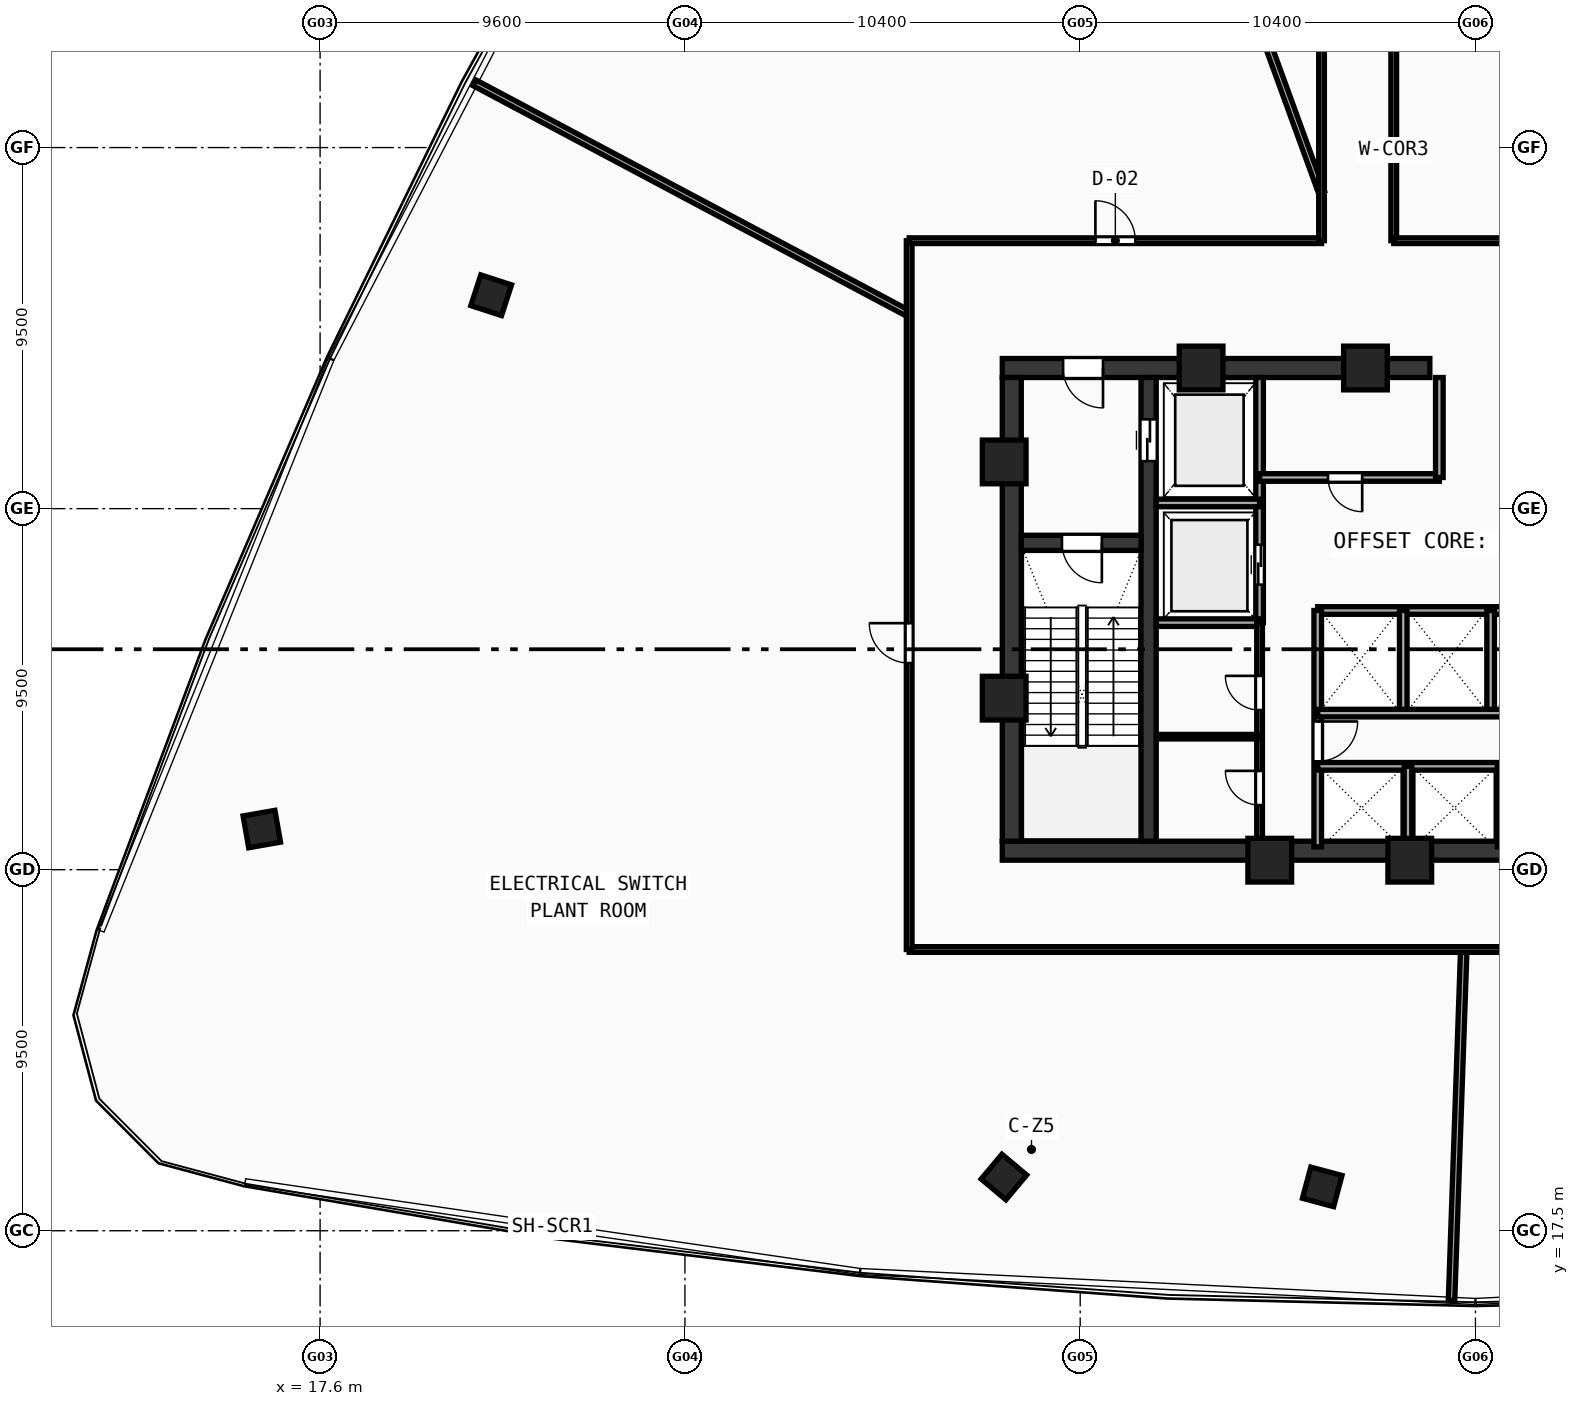
"""IFC4 building model, lengths in metres.
Left out: names, types, materials, properties, quantities, classifications, styles, units other than length and angle.
Written with IfcOpenShell. Run it as: python <this file> out.ifc"""

import sys

from ifc_helpers import new_model, si_unit, direction, frame, frame_2d, origin, origin_with_axes, origin_2d, place, context, subcontext, project, spatial, rectangle, hollow_rectangle, extrude, source, transform, mapped, element, fill, save


model = new_model("IFC4")
c1 = context("Model", 3, precision=1e-05, world=origin(), true_north=direction((0.0, 1.0)))
c2 = subcontext(c1, "Body", "Model", "MODEL_VIEW")
j1 = project(units=[si_unit("LENGTHUNIT", "METRE"), si_unit("PLANEANGLEUNIT", "RADIAN")], contexts=[c1])
p1 = place(None, origin())
s1 = spatial("IfcSite", under=j1, at=p1, CompositionType="ELEMENT")
p2 = place(p1, origin())
s2 = spatial("IfcBuilding", under=s1, at=p2, CompositionType="ELEMENT")
p3 = place(p2, frame((0.0, 0.0, 224.81)))
s3 = spatial("IfcBuildingStorey", under=s2, at=p3, CompositionType="ELEMENT", Elevation=224.81)
p4 = place(p3, frame((35.55, 27.5, 0.0), z_axis=(0.0, 0.0, 1.0), x_axis=(1.0, 0.0, 0.0)))
e1 = element("IfcWall", 1, at=p4, inside=s3, PredefinedType="SHEAR", context=c2, shape_type="SweptSolid", body=[
    extrude(rectangle(XDim=24.9, YDim=0.5, at=frame_2d((12.45, 0.0))), origin(), (0.0, 0.0, 1.0), 4.54),
])
p5 = place(p3, frame((35.55, 40.2, 0.0), z_axis=(0.0, 0.0, 1.0), x_axis=(1.0, 0.0, 0.0)))
e2 = element("IfcWall", 2, at=p5, inside=s3, PredefinedType="SHEAR", context=c2, shape_type="SweptSolid", body=[
    extrude(rectangle(XDim=11.25, YDim=0.5, at=frame_2d((5.625, 0.0))), origin(), (0.0, 0.0, 1.0), 4.54),
])
p6 = place(p5, frame((1.6, 0.0, 0.0)))
e3 = element("IfcOpeningElement", 3, at=p6, cuts=e2, PredefinedType="OPENING", context=c2, shape_type="SweptSolid", body=[
    extrude(rectangle(XDim=1.05, YDim=2.1, at=frame_2d((0.525, 1.05))), frame((0.0, 0.26, 0.0), z_axis=(0.0, -1.0, 0.0), x_axis=(1.0, 0.0, 0.0)), (0.0, 0.0, 1.0), 0.52),
])
p7 = place(p3, frame((35.8, 27.75, 0.0), z_axis=(0.0, 0.0, 1.0), x_axis=(0.0, 1.0, 0.0)))
e4 = element("IfcWall", 4, at=p7, inside=s3, PredefinedType="SHEAR", context=c2, shape_type="SweptSolid", body=[
    extrude(rectangle(XDim=12.2, YDim=0.5, at=frame_2d((6.1, 0.0))), origin(), (0.0, 0.0, 1.0), 4.54),
])
p8 = place(p3, frame((39.4, 27.75, 0.0), z_axis=(0.0, 0.0, 1.0), x_axis=(0.0, 1.0, 0.0)))
e5 = element("IfcWall", 5, at=p8, inside=s3, PredefinedType="SHEAR", context=c2, shape_type="SweptSolid", body=[
    extrude(rectangle(XDim=12.2, YDim=0.4, at=frame_2d((6.1, 0.0))), origin(), (0.0, 0.0, 1.0), 4.54),
])
p9 = place(p8, frame((10.0, 0.0, 0.0)))
e6 = element("IfcOpeningElement", 6, at=p9, cuts=e5, PredefinedType="OPENING", context=c2, shape_type="SweptSolid", body=[
    extrude(rectangle(XDim=1.1, YDim=2.1, at=frame_2d((0.55, 1.05))), frame((0.0, 0.21, 0.0), z_axis=(0.0, -1.0, 0.0), x_axis=(1.0, 0.0, 0.0)), (0.0, 0.0, 1.0), 0.42),
])
p10 = place(p3, frame((36.05, 35.6, 0.0), z_axis=(0.0, 0.0, 1.0), x_axis=(1.0, 0.0, 0.0)))
e7 = element("IfcWall", 7, at=p10, inside=s3, PredefinedType="SHEAR", context=c2, shape_type="SweptSolid", body=[
    extrude(rectangle(XDim=3.15, YDim=0.4, at=frame_2d((1.575, 0.0))), origin(), (0.0, 0.0, 1.0), 4.54),
])
p11 = place(p10, frame((1.07, 0.0, 0.0)))
e8 = element("IfcOpeningElement", 8, at=p11, cuts=e7, PredefinedType="OPENING", context=c2, shape_type="SweptSolid", body=[
    extrude(rectangle(XDim=1.05, YDim=2.1, at=frame_2d((0.525, 1.05))), frame((0.0, 0.21, 0.0), z_axis=(0.0, -1.0, 0.0), x_axis=(1.0, 0.0, 0.0)), (0.0, 0.0, 1.0), 0.42),
])
m1 = source(origin(), c2, "Body", "SweptSolid", [
    extrude(hollow_rectangle(XDim=1.15, YDim=1.15, WallThickness=0.048, at=origin_2d()), origin(), (0.0, 0.0, 1.0), 4.82),
])
for number, where, z_axis, x_axis in (
    (9, (42.588, 27.25, -0.28), (0.0, 0.0, 1.0), (1.0, 0.0, 0.0)),
    (10, (46.272, 27.25, -0.28), (0.0, 0.0, 1.0), (1.0, 0.0, 0.0)),
    (11, (45.106, 40.2, -0.28), (0.0, 0.0, 1.0), (1.0, 0.0, 0.0)),
    (12, (40.781, 40.2, -0.28), (0.0, 0.0, 1.0), (1.0, 0.0, 0.0)),
    (13, (35.6, 37.729, -0.28), (0.0, 0.0, 1.0), (1.0, 0.0, 0.0)),
    (14, (35.6, 31.513, -0.28), (0.0, 0.0, 1.0), (1.0, 0.0, 0.0)),
):
    element("IfcColumn", number, at=place(p3, frame(where, z_axis=z_axis, x_axis=x_axis)), inside=s3, PredefinedType="COLUMN", context=c2, shape_type="MappedRepresentation", body=[
        mapped(m1, transform((0.0, 0.0, 0.0), scale=1.0)),
    ])
m2 = source(origin(), c2, "Body", "SweptSolid", [
    extrude(hollow_rectangle(XDim=0.85, YDim=0.85, WallThickness=0.034, at=origin_2d()), origin(), (0.0, 0.0, 1.0), 4.82),
])
for number, where, z_axis, x_axis in (
    (15, (35.593, 18.914, -0.28), (0.0, 0.0, 1.0), (0.766, -0.643, 0.0)),
    (16, (43.969, 18.654, -0.28), (0.0, 0.0, 1.0), (0.966, -0.259, 0.0)),
    (17, (22.102, 42.115, -0.28), (0.0, 0.0, 1.0), (-0.309, -0.951, 0.0)),
    (18, (16.066, 28.069, -0.28), (0.0, 0.0, 1.0), (0.174, -0.985, 0.0)),
):
    element("IfcColumn", number, at=place(p3, frame(where, z_axis=z_axis, x_axis=x_axis)), inside=s3, PredefinedType="COLUMN", context=c2, shape_type="MappedRepresentation", body=[
        mapped(m2, transform((0.0, 0.0, 0.0), scale=1.0)),
    ])
p12 = place(p3, frame((42.32, 33.5, 0.0), z_axis=(0.0, 0.0, 1.0), x_axis=(0.0, 1.0, 0.0)))
e19 = element("IfcWall", 19, at=p12, inside=s3, PredefinedType="SOLIDWALL", context=c2, shape_type="SweptSolid", body=[
    extrude(rectangle(XDim=6.45, YDim=0.2, at=frame_2d((3.225, 0.0))), origin(), (0.0, 0.0, 1.0), 4.54),
])
p13 = place(p12, frame((1.0, 0.0, 0.0)))
e20 = element("IfcOpeningElement", 20, at=p13, cuts=e19, PredefinedType="OPENING", context=c2, shape_type="SweptSolid", body=[
    extrude(rectangle(XDim=1.05, YDim=2.1, at=frame_2d((0.525, 1.05))), frame((0.0, 0.11, 0.0), z_axis=(0.0, -1.0, 0.0), x_axis=(1.0, 0.0, 0.0)), (0.0, 0.0, 1.0), 0.22),
])
for number, where, z_axis, x_axis in (
    (21, (39.6, 36.65, 0.0), (0.0, 0.0, 1.0), (1.0, 0.0, 0.0)),
    (22, (39.6, 33.5, 0.0), (0.0, 0.0, 1.0), (1.0, 0.0, 0.0)),
):
    element("IfcWall", number, at=place(p3, frame(where, z_axis=z_axis, x_axis=x_axis)), inside=s3, PredefinedType="SOLIDWALL", context=c2, shape_type="SweptSolid", body=[
        extrude(rectangle(XDim=2.72, YDim=0.2, at=frame_2d((1.36, 0.0))), origin(), (0.0, 0.0, 1.0), 4.54),
    ])
p14 = place(p3, frame((42.32, 37.32, 0.0), z_axis=(0.0, 0.0, 1.0), x_axis=(1.0, 0.0, 0.0)))
e23 = element("IfcWall", 23, at=p14, inside=s3, PredefinedType="SOLIDWALL", context=c2, shape_type="SweptSolid", body=[
    extrude(rectangle(XDim=4.73, YDim=0.2, at=frame_2d((2.365, 0.0))), origin(), (0.0, 0.0, 1.0), 4.54),
])
p15 = place(p14, frame((1.8, 0.0, 0.0)))
e24 = element("IfcOpeningElement", 24, at=p15, cuts=e23, PredefinedType="OPENING", context=c2, shape_type="SweptSolid", body=[
    extrude(rectangle(XDim=0.9, YDim=2.1, at=frame_2d((0.45, 1.05))), frame((0.0, 0.11, 0.0), z_axis=(0.0, -1.0, 0.0), x_axis=(1.0, 0.0, 0.0)), (0.0, 0.0, 1.0), 0.22),
])
p16 = place(p3, frame((47.05, 37.32, 0.0), z_axis=(0.0, 0.0, 1.0), x_axis=(0.0, 1.0, 0.0)))
e25 = element("IfcWall", 25, at=p16, inside=s3, PredefinedType="SOLIDWALL", context=c2, shape_type="SweptSolid", body=[
    extrude(rectangle(XDim=2.63, YDim=0.2, at=frame_2d((1.315, 0.0))), origin(), (0.0, 0.0, 1.0), 4.54),
])
p17 = place(p3, frame((43.85, 33.82, 0.0), z_axis=(0.0, 0.0, 1.0), x_axis=(1.0, 0.0, 0.0)))
e26 = element("IfcWall", 26, at=p17, inside=s3, PredefinedType="SOLIDWALL", context=c2, shape_type="SweptSolid", body=[
    extrude(rectangle(XDim=9.83, YDim=0.2, at=frame_2d((4.915, 0.0))), origin(), (0.0, 0.0, 1.0), 4.54),
])
p18 = place(p3, frame((43.85, 27.6, 0.0), z_axis=(0.0, 0.0, 1.0), x_axis=(0.0, 1.0, 0.0)))
e27 = element("IfcWall", 27, at=p18, inside=s3, PredefinedType="SOLIDWALL", context=c2, shape_type="SweptSolid", body=[
    extrude(rectangle(XDim=6.22, YDim=0.2, at=frame_2d((3.11, 0.0))), origin(), (0.0, 0.0, 1.0), 4.54),
])
p19 = place(p18, frame((2.25, 0.0, 0.0)))
e28 = element("IfcOpeningElement", 28, at=p19, cuts=e27, PredefinedType="OPENING", context=c2, shape_type="SweptSolid", body=[
    extrude(rectangle(XDim=1.05, YDim=2.1, at=frame_2d((0.525, 1.05))), frame((0.0, 0.11, 0.0), z_axis=(0.0, -1.0, 0.0), x_axis=(1.0, 0.0, 0.0)), (0.0, 0.0, 1.0), 0.22),
])
for number, where, z_axis, x_axis in (
    (29, (46.1, 31.12, 0.0), (0.0, 0.0, 1.0), (0.0, 1.0, 0.0)),
    (30, (48.4, 31.12, 0.0), (0.0, 0.0, 1.0), (0.0, 1.0, 0.0)),
):
    element("IfcWall", number, at=place(p3, frame(where, z_axis=z_axis, x_axis=x_axis)), inside=s3, PredefinedType="SOLIDWALL", context=c2, shape_type="SweptSolid", body=[
        extrude(rectangle(XDim=2.7, YDim=0.2, at=frame_2d((1.35, 0.0))), origin(), (0.0, 0.0, 1.0), 4.54),
    ])
p20 = place(p3, frame((43.85, 29.72, 0.0), z_axis=(0.0, 0.0, 1.0), x_axis=(1.0, 0.0, 0.0)))
e31 = element("IfcWall", 31, at=p20, inside=s3, PredefinedType="SOLIDWALL", context=c2, shape_type="SweptSolid", body=[
    extrude(rectangle(XDim=7.2, YDim=0.2, at=frame_2d((3.6, 0.0))), origin(), (0.0, 0.0, 1.0), 4.54),
])
p21 = place(p3, frame((43.85, 31.12, 0.0), z_axis=(0.0, 0.0, 1.0), x_axis=(1.0, 0.0, 0.0)))
e32 = element("IfcWall", 32, at=p21, inside=s3, PredefinedType="SOLIDWALL", context=c2, shape_type="SweptSolid", body=[
    extrude(rectangle(XDim=9.83, YDim=0.2, at=frame_2d((4.915, 0.0))), origin(), (0.0, 0.0, 1.0), 4.54),
])
for number, where, z_axis, x_axis in (
    (33, (46.225, 27.6, 0.0), (0.0, 0.0, 1.0), (0.0, 1.0, 0.0)),
    (34, (48.675, 27.6, 0.0), (0.0, 0.0, 1.0), (0.0, 1.0, 0.0)),
):
    element("IfcWall", number, at=place(p3, frame(where, z_axis=z_axis, x_axis=x_axis)), inside=s3, PredefinedType="SOLIDWALL", context=c2, shape_type="SweptSolid", body=[
        extrude(rectangle(XDim=2.12, YDim=0.2, at=frame_2d((1.06, 0.0))), origin(), (0.0, 0.0, 1.0), 4.54),
    ])
p22 = place(p3, frame((42.32, 27.6, 0.0), z_axis=(0.0, 0.0, 1.0), x_axis=(0.0, 1.0, 0.0)))
e35 = element("IfcWall", 35, at=p22, inside=s3, PredefinedType="PARTITIONING", context=c2, shape_type="SweptSolid", body=[
    extrude(rectangle(XDim=5.9, YDim=0.15, at=frame_2d((2.95, 0.0))), origin(), (0.0, 0.0, 1.0), 4.54),
])
p23 = place(p22, frame((1.1, 0.0, 0.0)))
e36 = element("IfcOpeningElement", 36, at=p23, cuts=e35, PredefinedType="OPENING", context=c2, shape_type="SweptSolid", body=[
    extrude(rectangle(XDim=0.9, YDim=2.1, at=frame_2d((0.45, 1.05))), frame((0.0, 0.085, 0.0), z_axis=(0.0, -1.0, 0.0), x_axis=(1.0, 0.0, 0.0)), (0.0, 0.0, 1.0), 0.17),
])
p24 = place(p22, frame((3.6, 0.0, 0.0)))
e37 = element("IfcOpeningElement", 37, at=p24, cuts=e35, PredefinedType="OPENING", context=c2, shape_type="SweptSolid", body=[
    extrude(rectangle(XDim=0.9, YDim=2.1, at=frame_2d((0.45, 1.05))), frame((0.0, 0.085, 0.0), z_axis=(0.0, -1.0, 0.0), x_axis=(1.0, 0.0, 0.0)), (0.0, 0.0, 1.0), 0.17),
])
p25 = place(p3, frame((39.6, 30.5, 0.0), z_axis=(0.0, 0.0, 1.0), x_axis=(1.0, 0.0, 0.0)))
e38 = element("IfcWall", 38, at=p25, inside=s3, PredefinedType="PARTITIONING", context=c2, shape_type="SweptSolid", body=[
    extrude(rectangle(XDim=2.72, YDim=0.12, at=frame_2d((1.36, 0.0))), origin(), (0.0, 0.0, 1.0), 4.54),
])
p26 = place(p3, frame((43.95, 44.827, 0.0), z_axis=(0.0, 0.0, 1.0), x_axis=(-0.342014940405, 0.939694514478, 0.0)))
e39 = element("IfcWall", 39, at=p26, inside=s3, PredefinedType="PARTITIONING", context=c2, shape_type="SweptSolid", body=[
    extrude(rectangle(XDim=26.099, YDim=0.17, at=frame_2d((13.05, 0.0))), origin(), (0.0, 0.0, 1.0), 3.89),
])
p27 = place(p3, frame((33.1, 41.623, 0.0), z_axis=(0.0, 0.0, 1.0), x_axis=(-0.88294771871, 0.469471326093, 0.0)))
e40 = element("IfcWall", 40, at=p27, inside=s3, PredefinedType="PARTITIONING", context=c2, shape_type="SweptSolid", body=[
    extrude(rectangle(XDim=12.949, YDim=0.17, at=frame_2d((6.475, 0.0))), origin(), (0.0, 0.0, 1.0), 3.89),
])
p28 = place(p3, frame((47.693, 24.9, 0.0), z_axis=(0.0, 0.0, 1.0), x_axis=(-0.034893830419, -0.999391024874, 0.0)))
e41 = element("IfcWall", 41, at=p28, inside=s3, PredefinedType="PARTITIONING", context=c2, shape_type="SweptSolid", body=[
    extrude(rectangle(XDim=9.236, YDim=0.17, at=frame_2d((4.618, 0.0))), origin(), (0.0, 0.0, 1.0), 3.89),
])
p29 = place(p3, frame((45.85, 55.78, 0.0), z_axis=(0.0, 0.0, 1.0), x_axis=(0.0, -1.0, 0.0)))
e42 = element("IfcWall", 42, at=p29, inside=s3, PredefinedType="PARTITIONING", context=c2, shape_type="SweptSolid", body=[
    extrude(rectangle(XDim=12.23, YDim=0.15, at=frame_2d((6.115, 0.0))), origin(), (0.0, 0.0, 1.0), 4.19),
])
p30 = place(p29, frame((5.59, 0.0, 0.0)))
e43 = element("IfcOpeningElement", 43, at=p30, cuts=e42, PredefinedType="OPENING", context=c2, shape_type="SweptSolid", body=[
    extrude(rectangle(XDim=1.05, YDim=2.1, at=frame_2d((0.525, 1.05))), frame((0.0, 0.085, 0.0), z_axis=(0.0, -1.0, 0.0), x_axis=(1.0, 0.0, 0.0)), (0.0, 0.0, 1.0), 0.17),
])
p31 = place(p3, frame((45.85, 43.55, 0.0), z_axis=(0.0, 0.0, 1.0), x_axis=(1.0, 0.0, 0.0)))
e44 = element("IfcWall", 44, at=p31, inside=s3, PredefinedType="PARTITIONING", context=c2, shape_type="SweptSolid", body=[
    extrude(rectangle(XDim=17.05, YDim=0.15, at=frame_2d((8.525, 0.0))), origin(), (0.0, 0.0, 1.0), 3.89),
])
p32 = place(p31, frame((11.167, 0.0, 0.0)))
e45 = element("IfcOpeningElement", 45, at=p32, cuts=e44, PredefinedType="OPENING", context=c2, shape_type="SweptSolid", body=[
    extrude(rectangle(XDim=1.05, YDim=2.1, at=frame_2d((0.525, 1.05))), frame((0.0, 0.085, 0.0), z_axis=(0.0, -1.0, 0.0), x_axis=(1.0, 0.0, 0.0)), (0.0, 0.0, 1.0), 0.17),
])
p33 = place(p3, frame((62.9, 24.9, 0.0), z_axis=(0.0, 0.0, 1.0), x_axis=(-1.0, 0.0, 0.0)))
e46 = element("IfcWall", 46, at=p33, inside=s3, PredefinedType="PARTITIONING", context=c2, shape_type="SweptSolid", body=[
    extrude(rectangle(XDim=29.8, YDim=0.15, at=frame_2d((14.9, 0.0))), origin(), (0.0, 0.0, 1.0), 3.89),
])
p34 = place(p3, frame((33.1, 24.9, 0.0), z_axis=(0.0, 0.0, 1.0), x_axis=(0.0, 1.0, 0.0)))
e47 = element("IfcWall", 47, at=p34, inside=s3, PredefinedType="PARTITIONING", context=c2, shape_type="SweptSolid", body=[
    extrude(rectangle(XDim=18.65, YDim=0.15, at=frame_2d((9.325, 0.0))), origin(), (0.0, 0.0, 1.0), 3.89),
])
p35 = place(p34, frame((7.536, 0.0, 0.0)))
e48 = element("IfcOpeningElement", 48, at=p35, cuts=e47, PredefinedType="OPENING", context=c2, shape_type="SweptSolid", body=[
    extrude(rectangle(XDim=1.05, YDim=2.1, at=frame_2d((0.525, 1.05))), frame((0.0, 0.085, 0.0), z_axis=(0.0, -1.0, 0.0), x_axis=(1.0, 0.0, 0.0)), (0.0, 0.0, 1.0), 0.17),
])
p36 = place(p3, frame((33.1, 43.55, 0.0), z_axis=(0.0, 0.0, 1.0), x_axis=(1.0, 0.0, 0.0)))
e49 = element("IfcWall", 49, at=p36, inside=s3, PredefinedType="PARTITIONING", context=c2, shape_type="SweptSolid", body=[
    extrude(rectangle(XDim=10.85, YDim=0.15, at=frame_2d((5.425, 0.0))), origin(), (0.0, 0.0, 1.0), 3.89),
])
p37 = place(p36, frame((4.9, 0.0, 0.0)))
e50 = element("IfcOpeningElement", 50, at=p37, cuts=e49, PredefinedType="OPENING", context=c2, shape_type="SweptSolid", body=[
    extrude(rectangle(XDim=1.05, YDim=2.1, at=frame_2d((0.525, 1.05))), frame((0.0, 0.085, 0.0), z_axis=(0.0, -1.0, 0.0), x_axis=(1.0, 0.0, 0.0)), (0.0, 0.0, 1.0), 0.17),
])
p38 = place(p3, frame((43.95, 43.55, 0.0), z_axis=(0.0, 0.0, 1.0), x_axis=(0.0, 1.0, 0.0)))
e51 = element("IfcWall", 51, at=p38, inside=s3, PredefinedType="PARTITIONING", context=c2, shape_type="SweptSolid", body=[
    extrude(rectangle(XDim=12.23, YDim=0.15, at=frame_2d((6.115, 0.0))), origin(), (0.0, 0.0, 1.0), 4.19),
])
m3 = source(origin(), c2, "Body", "SweptSolid", [
    extrude(rectangle(XDim=1.05, YDim=2.1, at=frame_2d((0.525, 1.05))), frame((0.0, 0.025, 0.0), z_axis=(0.0, -1.0, 0.0), x_axis=(1.0, 0.0, 0.0)), (0.0, 0.0, 1.0), 0.05),
])
p39 = place(p11, frame((1.05, 0.0, 0.0), z_axis=(0.0, 0.0, 1.0), x_axis=(-1.0, 0.0, 0.0)))
e52 = element("IfcDoor", 52, at=p39, inside=s3, OperationType="SINGLE_SWING_LEFT", PredefinedType="DOOR", context=c2, shape_type="MappedRepresentation", body=[
    mapped(m3, transform((0.0, 0.0, 0.0), scale=1.0)),
])
fill(e8, e52)
p40 = place(p6, frame((1.05, 0.0, 0.0), z_axis=(0.0, 0.0, 1.0), x_axis=(-1.0, 0.0, 0.0)))
e53 = element("IfcDoor", 53, at=p40, inside=s3, OperationType="SINGLE_SWING_LEFT", PredefinedType="DOOR", context=c2, shape_type="MappedRepresentation", body=[
    mapped(m3, transform((0.0, 0.0, 0.0), scale=1.0)),
])
fill(e3, e53)
m4 = source(origin(), c2, "Body", "SweptSolid", [
    extrude(rectangle(XDim=1.1, YDim=2.1, at=frame_2d((0.55, 1.05))), frame((0.0, 0.025, 0.0), z_axis=(0.0, -1.0, 0.0), x_axis=(1.0, 0.0, 0.0)), (0.0, 0.0, 1.0), 0.05),
])
p41 = place(p9, frame((1.1, 0.0, 0.0), z_axis=(0.0, 0.0, 1.0), x_axis=(-1.0, 0.0, 0.0)))
e54 = element("IfcDoor", 54, at=p41, inside=s3, OperationType="DOUBLE_DOOR_SLIDING", PredefinedType="DOOR", context=c2, shape_type="MappedRepresentation", body=[
    mapped(m4, transform((0.0, 0.0, 0.0), scale=1.0)),
])
fill(e6, e54)
p42 = place(p13, origin_with_axes())
e55 = element("IfcDoor", 55, at=p42, inside=s3, OperationType="DOUBLE_DOOR_SLIDING", PredefinedType="DOOR", context=c2, shape_type="MappedRepresentation", body=[
    mapped(m3, transform((0.0, 0.0, 0.0), scale=1.0)),
])
fill(e20, e55)
m5 = source(origin(), c2, "Body", "SweptSolid", [
    extrude(rectangle(XDim=0.9, YDim=2.1, at=frame_2d((0.45, 1.05))), frame((0.0, 0.025, 0.0), z_axis=(0.0, -1.0, 0.0), x_axis=(1.0, 0.0, 0.0)), (0.0, 0.0, 1.0), 0.05),
])
p43 = place(p15, frame((0.9, 0.0, 0.0), z_axis=(0.0, 0.0, 1.0), x_axis=(-1.0, 0.0, 0.0)))
e56 = element("IfcDoor", 56, at=p43, inside=s3, OperationType="SINGLE_SWING_LEFT", PredefinedType="DOOR", context=c2, shape_type="MappedRepresentation", body=[
    mapped(m5, transform((0.0, 0.0, 0.0), scale=1.0)),
])
fill(e24, e56)
p44 = place(p19, frame((1.05, 0.0, 0.0), z_axis=(0.0, 0.0, 1.0), x_axis=(-1.0, 0.0, 0.0)))
e57 = element("IfcDoor", 57, at=p44, inside=s3, OperationType="SINGLE_SWING_LEFT", PredefinedType="DOOR", context=c2, shape_type="MappedRepresentation", body=[
    mapped(m3, transform((0.0, 0.0, 0.0), scale=1.0)),
])
fill(e28, e57)
p45 = place(p23, origin_with_axes())
e58 = element("IfcDoor", 58, at=p45, inside=s3, OperationType="SINGLE_SWING_RIGHT", PredefinedType="DOOR", context=c2, shape_type="MappedRepresentation", body=[
    mapped(m5, transform((0.0, 0.0, 0.0), scale=1.0)),
])
fill(e36, e58)
p46 = place(p24, origin_with_axes())
e59 = element("IfcDoor", 59, at=p46, inside=s3, OperationType="SINGLE_SWING_RIGHT", PredefinedType="DOOR", context=c2, shape_type="MappedRepresentation", body=[
    mapped(m5, transform((0.0, 0.0, 0.0), scale=1.0)),
])
fill(e37, e59)
p47 = place(p37, origin_with_axes())
e60 = element("IfcDoor", 60, at=p47, inside=s3, OperationType="SINGLE_SWING_LEFT", PredefinedType="DOOR", context=c2, shape_type="MappedRepresentation", body=[
    mapped(m3, transform((0.0, 0.0, 0.0), scale=1.0)),
])
fill(e50, e60)
p48 = place(p35, origin_with_axes())
e61 = element("IfcDoor", 61, at=p48, inside=s3, OperationType="SINGLE_SWING_RIGHT", PredefinedType="DOOR", context=c2, shape_type="MappedRepresentation", body=[
    mapped(m3, transform((0.0, 0.0, 0.0), scale=1.0)),
])
fill(e48, e61)
save(model, sys.argv[1])
